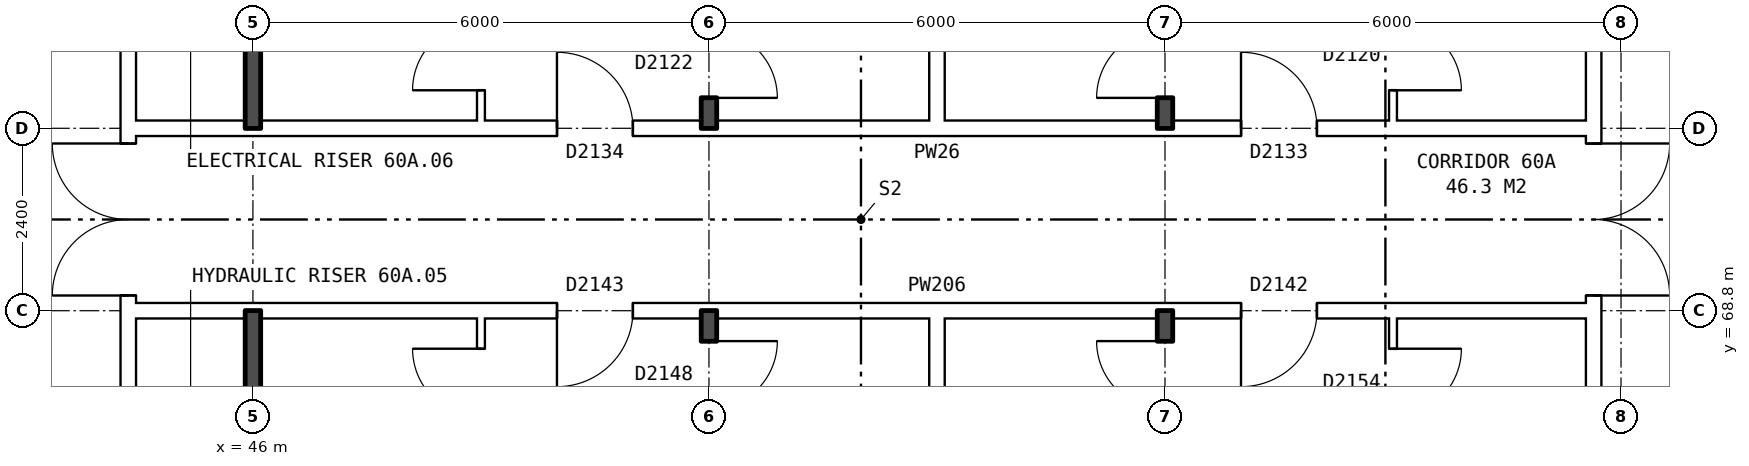
"""IFC4 building model, lengths in metres.
Left out: names, types, materials, properties, quantities, classifications, styles, units other than length and angle.
Written with IfcOpenShell. Run it as: python <this file> out.ifc"""

import sys

from ifc_helpers import new_model, si_unit, direction, frame, frame_2d, origin, place, context, subcontext, project, spatial, rectangle, extrude, element, fill, save


model = new_model("IFC4")
c1 = context("Model", 3, precision=1e-05, world=origin(), true_north=direction((0.0, 1.0)))
c2 = subcontext(c1, "Body", "Model", "MODEL_VIEW")
j1 = project(units=[si_unit("LENGTHUNIT", "METRE"), si_unit("PLANEANGLEUNIT", "RADIAN")], contexts=[c1])
p1 = place(None, origin())
s1 = spatial("IfcSite", under=j1, at=p1, CompositionType="ELEMENT")
p2 = place(p1, origin())
s2 = spatial("IfcBuilding", under=s1, at=p2, CompositionType="ELEMENT")
p3 = place(p2, frame((0.0, 0.0, 212.1)))
s3 = spatial("IfcBuildingStorey", under=s2, at=p3, CompositionType="ELEMENT", Elevation=212.1)
p4 = place(p3, frame((63.64, 63.9, 0.0), z_axis=(0.0, 0.0, 1.0), x_axis=(0.0, 1.0, 0.0)))
e1 = element("IfcWall", 1, at=p4, inside=s3, PredefinedType="PARTITIONING", context=c2, shape_type="SweptSolid", body=[
    extrude(rectangle(XDim=12.2, YDim=0.2, at=frame_2d((6.1, 0.0))), origin(), (0.0, 0.0, 1.0), 2.85),
])
p5 = place(p4, frame((5.1, 0.0, 0.0)))
e2 = element("IfcOpeningElement", 2, at=p5, cuts=e1, PredefinedType="OPENING", context=c2, shape_type="SweptSolid", body=[
    extrude(rectangle(XDim=2.0, YDim=2.1, at=frame_2d((1.0, 1.05))), frame((0.0, 0.11, 0.0), z_axis=(0.0, -1.0, 0.0), x_axis=(1.0, 0.0, 0.0)), (0.0, 0.0, 1.0), 0.22),
])
p6 = place(p3, frame((44.36, 63.9, 0.0), z_axis=(0.0, 0.0, 1.0), x_axis=(0.0, 1.0, 0.0)))
e3 = element("IfcWall", 3, at=p6, inside=s3, PredefinedType="PARTITIONING", context=c2, shape_type="SweptSolid", body=[
    extrude(rectangle(XDim=12.2, YDim=0.2, at=frame_2d((6.1, 0.0))), origin(), (0.0, 0.0, 1.0), 2.85),
])
p7 = place(p6, frame((5.1, 0.0, 0.0)))
e4 = element("IfcOpeningElement", 4, at=p7, cuts=e3, PredefinedType="OPENING", context=c2, shape_type="SweptSolid", body=[
    extrude(rectangle(XDim=2.0, YDim=2.1, at=frame_2d((1.0, 1.05))), frame((0.0, 0.11, 0.0), z_axis=(0.0, -1.0, 0.0), x_axis=(1.0, 0.0, 0.0)), (0.0, 0.0, 1.0), 0.22),
])
p8 = place(p3, frame((44.36, 68.8, 0.0), z_axis=(0.0, 0.0, 1.0), x_axis=(1.0, 0.0, 0.0)))
e5 = element("IfcWall", 5, at=p8, inside=s3, PredefinedType="PARTITIONING", context=c2, shape_type="SweptSolid", body=[
    extrude(rectangle(XDim=19.28, YDim=0.2, at=frame_2d((9.64, 0.0))), origin(), (0.0, 0.0, 1.0), 2.85),
])
p9 = place(p8, frame((14.64, 0.0, 0.0)))
e6 = element("IfcOpeningElement", 6, at=p9, cuts=e5, PredefinedType="OPENING", context=c2, shape_type="SweptSolid", body=[
    extrude(rectangle(XDim=1.0, YDim=2.1, at=frame_2d((0.5, 1.05))), frame((0.0, 0.11, 0.0), z_axis=(0.0, -1.0, 0.0), x_axis=(1.0, 0.0, 0.0)), (0.0, 0.0, 1.0), 0.22),
])
p10 = place(p8, frame((5.64, 0.0, 0.0)))
e7 = element("IfcOpeningElement", 7, at=p10, cuts=e5, PredefinedType="OPENING", context=c2, shape_type="SweptSolid", body=[
    extrude(rectangle(XDim=1.0, YDim=2.1, at=frame_2d((0.5, 1.05))), frame((0.0, 0.11, 0.0), z_axis=(0.0, -1.0, 0.0), x_axis=(1.0, 0.0, 0.0)), (0.0, 0.0, 1.0), 0.22),
])
p11 = place(p3, frame((44.36, 71.2, 0.0), z_axis=(0.0, 0.0, 1.0), x_axis=(1.0, 0.0, 0.0)))
e8 = element("IfcWall", 8, at=p11, inside=s3, PredefinedType="PARTITIONING", context=c2, shape_type="SweptSolid", body=[
    extrude(rectangle(XDim=19.28, YDim=0.2, at=frame_2d((9.64, 0.0))), origin(), (0.0, 0.0, 1.0), 2.85),
])
p12 = place(p11, frame((14.64, 0.0, 0.0)))
e9 = element("IfcOpeningElement", 9, at=p12, cuts=e8, PredefinedType="OPENING", context=c2, shape_type="SweptSolid", body=[
    extrude(rectangle(XDim=1.0, YDim=2.1, at=frame_2d((0.5, 1.05))), frame((0.0, 0.11, 0.0), z_axis=(0.0, -1.0, 0.0), x_axis=(1.0, 0.0, 0.0)), (0.0, 0.0, 1.0), 0.22),
])
p13 = place(p11, frame((5.64, 0.0, 0.0)))
e10 = element("IfcOpeningElement", 10, at=p13, cuts=e8, PredefinedType="OPENING", context=c2, shape_type="SweptSolid", body=[
    extrude(rectangle(XDim=1.0, YDim=2.1, at=frame_2d((0.5, 1.05))), frame((0.0, 0.11, 0.0), z_axis=(0.0, -1.0, 0.0), x_axis=(1.0, 0.0, 0.0)), (0.0, 0.0, 1.0), 0.22),
])
for number, where, z_axis, x_axis in (
    (11, (46.0, 54.36, 0.0), (0.0, 0.0, 1.0), (0.0, 1.0, 0.0)),
    (12, (46.0, 71.2, 0.0), (0.0, 0.0, 1.0), (0.0, 1.0, 0.0)),
):
    element("IfcWall", number, at=place(p3, frame(where, z_axis=z_axis, x_axis=x_axis)), inside=s3, PredefinedType="SOLIDWALL", context=c2, shape_type="SweptSolid", body=[
        extrude(rectangle(XDim=14.44, YDim=0.2, at=frame_2d((7.22, 0.0))), origin(), (0.0, 0.0, 1.0), 2.85),
    ])
p14 = place(p3, frame((49.0, 54.36, 0.0), z_axis=(0.0, 0.0, 1.0), x_axis=(0.0, 1.0, 0.0)))
e13 = element("IfcWall", 13, at=p14, inside=s3, PredefinedType="PARTITIONING", context=c2, shape_type="SweptSolid", body=[
    extrude(rectangle(XDim=14.34, YDim=0.1, at=frame_2d((7.17, 0.0))), origin(), (0.0, 0.0, 1.0), 2.85),
])
p15 = place(p14, frame((5.5, 0.0, 0.0)))
e14 = element("IfcOpeningElement", 14, at=p15, cuts=e13, PredefinedType="OPENING", context=c2, shape_type="SweptSolid", body=[
    extrude(rectangle(XDim=0.9, YDim=2.1, at=frame_2d((0.45, 1.05))), frame((0.0, 0.06, 0.0), z_axis=(0.0, -1.0, 0.0), x_axis=(1.0, 0.0, 0.0)), (0.0, 0.0, 1.0), 0.12),
])
p16 = place(p14, frame((13.04, 0.0, 0.0)))
e15 = element("IfcOpeningElement", 15, at=p16, cuts=e13, PredefinedType="OPENING", context=c2, shape_type="SweptSolid", body=[
    extrude(rectangle(XDim=0.9, YDim=2.1, at=frame_2d((0.45, 1.05))), frame((0.0, 0.06, 0.0), z_axis=(0.0, -1.0, 0.0), x_axis=(1.0, 0.0, 0.0)), (0.0, 0.0, 1.0), 0.12),
])
p17 = place(p3, frame((49.0, 71.3, 0.0), z_axis=(0.0, 0.0, 1.0), x_axis=(0.0, 1.0, 0.0)))
e16 = element("IfcWall", 16, at=p17, inside=s3, PredefinedType="PARTITIONING", context=c2, shape_type="SweptSolid", body=[
    extrude(rectangle(XDim=14.34, YDim=0.1, at=frame_2d((7.17, 0.0))), origin(), (0.0, 0.0, 1.0), 2.85),
])
p18 = place(p17, frame((6.74, 0.0, 0.0)))
e17 = element("IfcOpeningElement", 17, at=p18, cuts=e16, PredefinedType="OPENING", context=c2, shape_type="SweptSolid", body=[
    extrude(rectangle(XDim=0.9, YDim=2.1, at=frame_2d((0.45, 1.05))), frame((0.0, 0.06, 0.0), z_axis=(0.0, -1.0, 0.0), x_axis=(1.0, 0.0, 0.0)), (0.0, 0.0, 1.0), 0.12),
])
p19 = place(p17, frame((0.4, 0.0, 0.0)))
e18 = element("IfcOpeningElement", 18, at=p19, cuts=e16, PredefinedType="OPENING", context=c2, shape_type="SweptSolid", body=[
    extrude(rectangle(XDim=0.9, YDim=2.1, at=frame_2d((0.45, 1.05))), frame((0.0, 0.06, 0.0), z_axis=(0.0, -1.0, 0.0), x_axis=(1.0, 0.0, 0.0)), (0.0, 0.0, 1.0), 0.12),
])
p20 = place(p3, frame((52.0, 54.36, 0.0), z_axis=(0.0, 0.0, 1.0), x_axis=(0.0, 1.0, 0.0)))
e19 = element("IfcWall", 19, at=p20, inside=s3, PredefinedType="SOLIDWALL", context=c2, shape_type="SweptSolid", body=[
    extrude(rectangle(XDim=14.44, YDim=0.2, at=frame_2d((7.22, 0.0))), origin(), (0.0, 0.0, 1.0), 2.85),
])
p21 = place(p20, frame((5.5, 0.0, 0.0)))
e20 = element("IfcOpeningElement", 20, at=p21, cuts=e19, PredefinedType="OPENING", context=c2, shape_type="SweptSolid", body=[
    extrude(rectangle(XDim=0.9, YDim=2.1, at=frame_2d((0.45, 1.05))), frame((0.0, 0.11, 0.0), z_axis=(0.0, -1.0, 0.0), x_axis=(1.0, 0.0, 0.0)), (0.0, 0.0, 1.0), 0.22),
])
p22 = place(p20, frame((13.14, 0.0, 0.0)))
e21 = element("IfcOpeningElement", 21, at=p22, cuts=e19, PredefinedType="OPENING", context=c2, shape_type="SweptSolid", body=[
    extrude(rectangle(XDim=0.9, YDim=2.1, at=frame_2d((0.45, 1.05))), frame((0.0, 0.11, 0.0), z_axis=(0.0, -1.0, 0.0), x_axis=(1.0, 0.0, 0.0)), (0.0, 0.0, 1.0), 0.22),
])
p23 = place(p3, frame((52.0, 71.2, 0.0), z_axis=(0.0, 0.0, 1.0), x_axis=(0.0, 1.0, 0.0)))
e22 = element("IfcWall", 22, at=p23, inside=s3, PredefinedType="SOLIDWALL", context=c2, shape_type="SweptSolid", body=[
    extrude(rectangle(XDim=14.44, YDim=0.2, at=frame_2d((7.22, 0.0))), origin(), (0.0, 0.0, 1.0), 2.85),
])
p24 = place(p23, frame((6.84, 0.0, 0.0)))
e23 = element("IfcOpeningElement", 23, at=p24, cuts=e22, PredefinedType="OPENING", context=c2, shape_type="SweptSolid", body=[
    extrude(rectangle(XDim=0.9, YDim=2.1, at=frame_2d((0.45, 1.05))), frame((0.0, 0.11, 0.0), z_axis=(0.0, -1.0, 0.0), x_axis=(1.0, 0.0, 0.0)), (0.0, 0.0, 1.0), 0.22),
])
p25 = place(p23, frame((0.4, 0.0, 0.0)))
e24 = element("IfcOpeningElement", 24, at=p25, cuts=e22, PredefinedType="OPENING", context=c2, shape_type="SweptSolid", body=[
    extrude(rectangle(XDim=0.9, YDim=2.1, at=frame_2d((0.45, 1.05))), frame((0.0, 0.11, 0.0), z_axis=(0.0, -1.0, 0.0), x_axis=(1.0, 0.0, 0.0)), (0.0, 0.0, 1.0), 0.22),
])
for number, where, z_axis, x_axis in (
    (25, (55.0, 54.36, 0.0), (0.0, 0.0, 1.0), (0.0, 1.0, 0.0)),
    (26, (55.0, 71.3, 0.0), (0.0, 0.0, 1.0), (0.0, 1.0, 0.0)),
):
    element("IfcWall", number, at=place(p3, frame(where, z_axis=z_axis, x_axis=x_axis)), inside=s3, PredefinedType="PARTITIONING", context=c2, shape_type="SweptSolid", body=[
        extrude(rectangle(XDim=14.34, YDim=0.2, at=frame_2d((7.17, 0.0))), origin(), (0.0, 0.0, 1.0), 2.85),
    ])
p26 = place(p3, frame((58.0, 54.36, 0.0), z_axis=(0.0, 0.0, 1.0), x_axis=(0.0, 1.0, 0.0)))
e27 = element("IfcWall", 27, at=p26, inside=s3, PredefinedType="SOLIDWALL", context=c2, shape_type="SweptSolid", body=[
    extrude(rectangle(XDim=14.44, YDim=0.2, at=frame_2d((7.22, 0.0))), origin(), (0.0, 0.0, 1.0), 2.85),
])
p27 = place(p26, frame((4.2, 0.0, 0.0)))
e28 = element("IfcOpeningElement", 28, at=p27, cuts=e27, PredefinedType="OPENING", context=c2, shape_type="SweptSolid", body=[
    extrude(rectangle(XDim=0.9, YDim=2.1, at=frame_2d((0.45, 1.05))), frame((0.0, 0.11, 0.0), z_axis=(0.0, -1.0, 0.0), x_axis=(1.0, 0.0, 0.0)), (0.0, 0.0, 1.0), 0.22),
])
p28 = place(p26, frame((13.14, 0.0, 0.0)))
e29 = element("IfcOpeningElement", 29, at=p28, cuts=e27, PredefinedType="OPENING", context=c2, shape_type="SweptSolid", body=[
    extrude(rectangle(XDim=0.9, YDim=2.1, at=frame_2d((0.45, 1.05))), frame((0.0, 0.11, 0.0), z_axis=(0.0, -1.0, 0.0), x_axis=(1.0, 0.0, 0.0)), (0.0, 0.0, 1.0), 0.22),
])
p29 = place(p3, frame((58.0, 71.2, 0.0), z_axis=(0.0, 0.0, 1.0), x_axis=(0.0, 1.0, 0.0)))
e30 = element("IfcWall", 30, at=p29, inside=s3, PredefinedType="SOLIDWALL", context=c2, shape_type="SweptSolid", body=[
    extrude(rectangle(XDim=14.44, YDim=0.2, at=frame_2d((7.22, 0.0))), origin(), (0.0, 0.0, 1.0), 2.85),
])
p30 = place(p29, frame((5.84, 0.0, 0.0)))
e31 = element("IfcOpeningElement", 31, at=p30, cuts=e30, PredefinedType="OPENING", context=c2, shape_type="SweptSolid", body=[
    extrude(rectangle(XDim=0.9, YDim=2.1, at=frame_2d((0.45, 1.05))), frame((0.0, 0.11, 0.0), z_axis=(0.0, -1.0, 0.0), x_axis=(1.0, 0.0, 0.0)), (0.0, 0.0, 1.0), 0.22),
])
p31 = place(p29, frame((0.4, 0.0, 0.0)))
e32 = element("IfcOpeningElement", 32, at=p31, cuts=e30, PredefinedType="OPENING", context=c2, shape_type="SweptSolid", body=[
    extrude(rectangle(XDim=0.9, YDim=2.1, at=frame_2d((0.45, 1.05))), frame((0.0, 0.11, 0.0), z_axis=(0.0, -1.0, 0.0), x_axis=(1.0, 0.0, 0.0)), (0.0, 0.0, 1.0), 0.22),
])
p32 = place(p3, frame((61.0, 54.36, 0.0), z_axis=(0.0, 0.0, 1.0), x_axis=(0.0, 1.0, 0.0)))
e33 = element("IfcWall", 33, at=p32, inside=s3, PredefinedType="PARTITIONING", context=c2, shape_type="SweptSolid", body=[
    extrude(rectangle(XDim=14.34, YDim=0.1, at=frame_2d((7.17, 0.0))), origin(), (0.0, 0.0, 1.0), 2.85),
])
p33 = place(p32, frame((4.2, 0.0, 0.0)))
e34 = element("IfcOpeningElement", 34, at=p33, cuts=e33, PredefinedType="OPENING", context=c2, shape_type="SweptSolid", body=[
    extrude(rectangle(XDim=0.9, YDim=2.1, at=frame_2d((0.45, 1.05))), frame((0.0, 0.06, 0.0), z_axis=(0.0, -1.0, 0.0), x_axis=(1.0, 0.0, 0.0)), (0.0, 0.0, 1.0), 0.12),
])
p34 = place(p32, frame((13.04, 0.0, 0.0)))
e35 = element("IfcOpeningElement", 35, at=p34, cuts=e33, PredefinedType="OPENING", context=c2, shape_type="SweptSolid", body=[
    extrude(rectangle(XDim=0.9, YDim=2.1, at=frame_2d((0.45, 1.05))), frame((0.0, 0.06, 0.0), z_axis=(0.0, -1.0, 0.0), x_axis=(1.0, 0.0, 0.0)), (0.0, 0.0, 1.0), 0.12),
])
p35 = place(p3, frame((61.0, 71.3, 0.0), z_axis=(0.0, 0.0, 1.0), x_axis=(0.0, 1.0, 0.0)))
e36 = element("IfcWall", 36, at=p35, inside=s3, PredefinedType="PARTITIONING", context=c2, shape_type="SweptSolid", body=[
    extrude(rectangle(XDim=14.34, YDim=0.1, at=frame_2d((7.17, 0.0))), origin(), (0.0, 0.0, 1.0), 2.85),
])
p36 = place(p35, frame((5.74, 0.0, 0.0)))
e37 = element("IfcOpeningElement", 37, at=p36, cuts=e36, PredefinedType="OPENING", context=c2, shape_type="SweptSolid", body=[
    extrude(rectangle(XDim=0.9, YDim=2.1, at=frame_2d((0.45, 1.05))), frame((0.0, 0.06, 0.0), z_axis=(0.0, -1.0, 0.0), x_axis=(1.0, 0.0, 0.0)), (0.0, 0.0, 1.0), 0.12),
])
p37 = place(p35, frame((0.4, 0.0, 0.0)))
e38 = element("IfcOpeningElement", 38, at=p37, cuts=e36, PredefinedType="OPENING", context=c2, shape_type="SweptSolid", body=[
    extrude(rectangle(XDim=0.9, YDim=2.1, at=frame_2d((0.45, 1.05))), frame((0.0, 0.06, 0.0), z_axis=(0.0, -1.0, 0.0), x_axis=(1.0, 0.0, 0.0)), (0.0, 0.0, 1.0), 0.12),
])
p38 = place(p5, frame((2.0, 0.0, 0.0), z_axis=(0.0, 0.0, 1.0), x_axis=(-1.0, 0.0, 0.0)))
e39 = element("IfcDoor", 39, at=p38, inside=s3, OperationType="DOUBLE_DOOR_SINGLE_SWING", PredefinedType="DOOR", context=c2, shape_type="SweptSolid", body=[
    extrude(rectangle(XDim=2.0, YDim=2.1, at=frame_2d((1.0, 1.05))), frame((0.0, 0.025, 0.0), z_axis=(0.0, -1.0, 0.0), x_axis=(1.0, 0.0, 0.0)), (0.0, 0.0, 1.0), 0.05),
])
fill(e2, e39)
p39 = place(p7, origin())
e40 = element("IfcDoor", 40, at=p39, inside=s3, OperationType="DOUBLE_DOOR_SINGLE_SWING", PredefinedType="DOOR", context=c2, shape_type="SweptSolid", body=[
    extrude(rectangle(XDim=2.0, YDim=2.1, at=frame_2d((1.0, 1.05))), frame((0.0, 0.025, 0.0), z_axis=(0.0, -1.0, 0.0), x_axis=(1.0, 0.0, 0.0)), (0.0, 0.0, 1.0), 0.05),
])
fill(e4, e40)
p40 = place(p9, frame((1.0, 0.0, 0.0), z_axis=(0.0, 0.0, 1.0), x_axis=(-1.0, 0.0, 0.0)))
e41 = element("IfcDoor", 41, at=p40, inside=s3, OperationType="SINGLE_SWING_RIGHT", PredefinedType="DOOR", context=c2, shape_type="SweptSolid", body=[
    extrude(rectangle(XDim=1.0, YDim=2.1, at=frame_2d((0.5, 1.05))), frame((0.0, 0.025, 0.0), z_axis=(0.0, -1.0, 0.0), x_axis=(1.0, 0.0, 0.0)), (0.0, 0.0, 1.0), 0.05),
])
fill(e6, e41)
p41 = place(p34, frame((0.9, 0.0, 0.0), z_axis=(0.0, 0.0, 1.0), x_axis=(-1.0, 0.0, 0.0)))
e42 = element("IfcDoor", 42, at=p41, inside=s3, OperationType="SINGLE_SWING_LEFT", PredefinedType="DOOR", context=c2, shape_type="SweptSolid", body=[
    extrude(rectangle(XDim=0.9, YDim=2.1, at=frame_2d((0.45, 1.05))), frame((0.0, 0.025, 0.0), z_axis=(0.0, -1.0, 0.0), x_axis=(1.0, 0.0, 0.0)), (0.0, 0.0, 1.0), 0.05),
])
fill(e35, e42)
p42 = place(p28, origin())
e43 = element("IfcDoor", 43, at=p42, inside=s3, OperationType="SINGLE_SWING_RIGHT", PredefinedType="DOOR", context=c2, shape_type="SweptSolid", body=[
    extrude(rectangle(XDim=0.9, YDim=2.1, at=frame_2d((0.45, 1.05))), frame((0.0, 0.025, 0.0), z_axis=(0.0, -1.0, 0.0), x_axis=(1.0, 0.0, 0.0)), (0.0, 0.0, 1.0), 0.05),
])
fill(e29, e43)
p43 = place(p10, frame((1.0, 0.0, 0.0), z_axis=(0.0, 0.0, 1.0), x_axis=(-1.0, 0.0, 0.0)))
e44 = element("IfcDoor", 44, at=p43, inside=s3, OperationType="SINGLE_SWING_RIGHT", PredefinedType="DOOR", context=c2, shape_type="SweptSolid", body=[
    extrude(rectangle(XDim=1.0, YDim=2.1, at=frame_2d((0.5, 1.05))), frame((0.0, 0.025, 0.0), z_axis=(0.0, -1.0, 0.0), x_axis=(1.0, 0.0, 0.0)), (0.0, 0.0, 1.0), 0.05),
])
fill(e7, e44)
p44 = place(p22, frame((0.9, 0.0, 0.0), z_axis=(0.0, 0.0, 1.0), x_axis=(-1.0, 0.0, 0.0)))
e45 = element("IfcDoor", 45, at=p44, inside=s3, OperationType="SINGLE_SWING_LEFT", PredefinedType="DOOR", context=c2, shape_type="SweptSolid", body=[
    extrude(rectangle(XDim=0.9, YDim=2.1, at=frame_2d((0.45, 1.05))), frame((0.0, 0.025, 0.0), z_axis=(0.0, -1.0, 0.0), x_axis=(1.0, 0.0, 0.0)), (0.0, 0.0, 1.0), 0.05),
])
fill(e21, e45)
p45 = place(p16, origin())
e46 = element("IfcDoor", 46, at=p45, inside=s3, OperationType="SINGLE_SWING_RIGHT", PredefinedType="DOOR", context=c2, shape_type="SweptSolid", body=[
    extrude(rectangle(XDim=0.9, YDim=2.1, at=frame_2d((0.45, 1.05))), frame((0.0, 0.025, 0.0), z_axis=(0.0, -1.0, 0.0), x_axis=(1.0, 0.0, 0.0)), (0.0, 0.0, 1.0), 0.05),
])
fill(e15, e46)
p46 = place(p12, origin())
e47 = element("IfcDoor", 47, at=p46, inside=s3, OperationType="SINGLE_SWING_LEFT", PredefinedType="DOOR", context=c2, shape_type="SweptSolid", body=[
    extrude(rectangle(XDim=1.0, YDim=2.1, at=frame_2d((0.5, 1.05))), frame((0.0, 0.025, 0.0), z_axis=(0.0, -1.0, 0.0), x_axis=(1.0, 0.0, 0.0)), (0.0, 0.0, 1.0), 0.05),
])
fill(e9, e47)
p47 = place(p37, frame((0.9, 0.0, 0.0), z_axis=(0.0, 0.0, 1.0), x_axis=(-1.0, 0.0, 0.0)))
e48 = element("IfcDoor", 48, at=p47, inside=s3, OperationType="SINGLE_SWING_RIGHT", PredefinedType="DOOR", context=c2, shape_type="SweptSolid", body=[
    extrude(rectangle(XDim=0.9, YDim=2.1, at=frame_2d((0.45, 1.05))), frame((0.0, 0.025, 0.0), z_axis=(0.0, -1.0, 0.0), x_axis=(1.0, 0.0, 0.0)), (0.0, 0.0, 1.0), 0.05),
])
fill(e38, e48)
p48 = place(p31, origin())
e49 = element("IfcDoor", 49, at=p48, inside=s3, OperationType="SINGLE_SWING_LEFT", PredefinedType="DOOR", context=c2, shape_type="SweptSolid", body=[
    extrude(rectangle(XDim=0.9, YDim=2.1, at=frame_2d((0.45, 1.05))), frame((0.0, 0.025, 0.0), z_axis=(0.0, -1.0, 0.0), x_axis=(1.0, 0.0, 0.0)), (0.0, 0.0, 1.0), 0.05),
])
fill(e32, e49)
p49 = place(p13, origin())
e50 = element("IfcDoor", 50, at=p49, inside=s3, OperationType="SINGLE_SWING_LEFT", PredefinedType="DOOR", context=c2, shape_type="SweptSolid", body=[
    extrude(rectangle(XDim=1.0, YDim=2.1, at=frame_2d((0.5, 1.05))), frame((0.0, 0.025, 0.0), z_axis=(0.0, -1.0, 0.0), x_axis=(1.0, 0.0, 0.0)), (0.0, 0.0, 1.0), 0.05),
])
fill(e10, e50)
p50 = place(p25, frame((0.9, 0.0, 0.0), z_axis=(0.0, 0.0, 1.0), x_axis=(-1.0, 0.0, 0.0)))
e51 = element("IfcDoor", 51, at=p50, inside=s3, OperationType="SINGLE_SWING_RIGHT", PredefinedType="DOOR", context=c2, shape_type="SweptSolid", body=[
    extrude(rectangle(XDim=0.9, YDim=2.1, at=frame_2d((0.45, 1.05))), frame((0.0, 0.025, 0.0), z_axis=(0.0, -1.0, 0.0), x_axis=(1.0, 0.0, 0.0)), (0.0, 0.0, 1.0), 0.05),
])
fill(e24, e51)
p51 = place(p19, origin())
e52 = element("IfcDoor", 52, at=p51, inside=s3, OperationType="SINGLE_SWING_LEFT", PredefinedType="DOOR", context=c2, shape_type="SweptSolid", body=[
    extrude(rectangle(XDim=0.9, YDim=2.1, at=frame_2d((0.45, 1.05))), frame((0.0, 0.025, 0.0), z_axis=(0.0, -1.0, 0.0), x_axis=(1.0, 0.0, 0.0)), (0.0, 0.0, 1.0), 0.05),
])
fill(e18, e52)
save(model, sys.argv[1])
